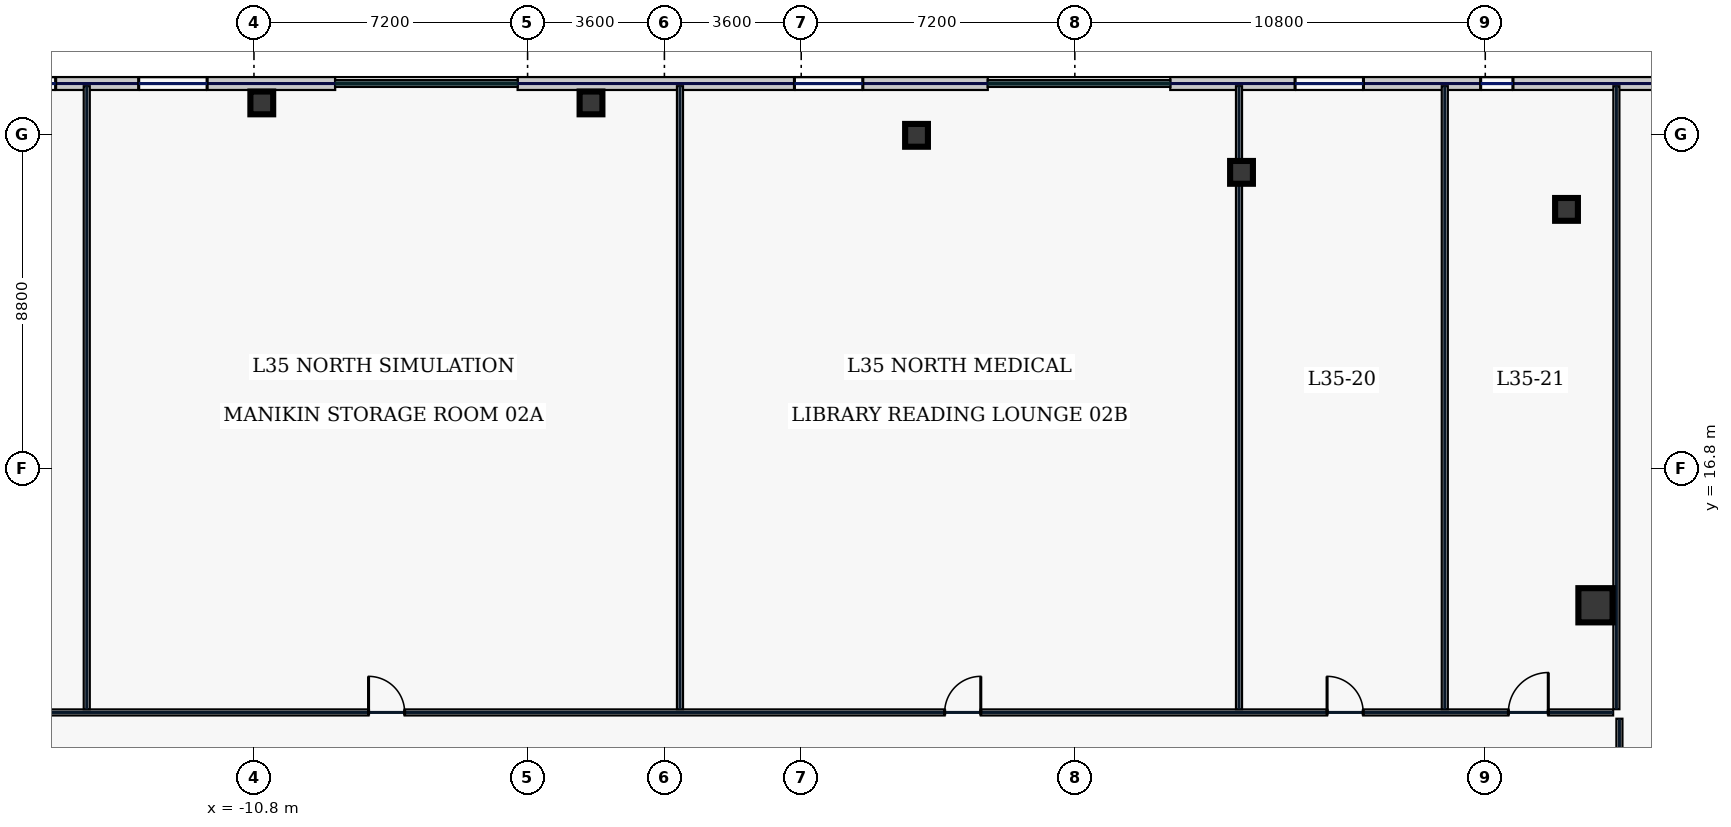
"""IFC4 building model, lengths in metres.
Left out: names, types, materials, properties, quantities, classifications, styles, units other than length and angle.
Written with IfcOpenShell. Run it as: python <this file> out.ifc"""

import sys

from ifc_helpers import new_model, si_unit, direction, frame, frame_2d, origin, origin_2d, place, context, subcontext, project, spatial, rectangle, hollow_rectangle, extrude, element, fill, save


model = new_model("IFC4")
c1 = context("Model", 3, precision=1e-05, world=origin(), true_north=direction((0.0, 1.0)))
c2 = subcontext(c1, "Body", "Model", "MODEL_VIEW")
j1 = project(units=[si_unit("LENGTHUNIT", "METRE"), si_unit("PLANEANGLEUNIT", "RADIAN")], contexts=[c1])
p1 = place(None, origin())
s1 = spatial("IfcSite", under=j1, at=p1, CompositionType="ELEMENT")
p2 = place(p1, origin())
s2 = spatial("IfcBuilding", under=s1, at=p2, CompositionType="ELEMENT")
p3 = place(p2, frame((0.0, 0.0, 156.2)))
s3 = spatial("IfcBuildingStorey", under=s2, at=p3, CompositionType="ELEMENT", Elevation=156.2)
p4 = place(p3, frame((24.5, 13.2, 0.0), z_axis=(0.0, 0.0, 1.0), x_axis=(1.0, 0.0, 0.0)))
e1 = element("IfcColumn", 1, at=p4, inside=s3, PredefinedType="COLUMN", context=c2, shape_type="SweptSolid", body=[
    extrude(hollow_rectangle(XDim=0.9, YDim=0.9, WallThickness=0.04, at=origin_2d()), origin(), (0.0, 0.0, 1.0), 3.74),
])
for number, where, z_axis, x_axis in (
    (2, (23.738, 23.618, 0.0), (0.0, 0.0, 1.0), (1.0, 0.0, 0.0)),
    (3, (15.186, 24.592, 0.0), (0.0, 0.0, 1.0), (1.0, 0.0, 0.0)),
    (4, (6.634, 25.567, 0.0), (0.0, 0.0, 1.0), (1.0, 0.0, 0.0)),
    (5, (-1.931, 26.42, 0.0), (0.0, 0.0, 1.0), (1.0, 0.0, 0.0)),
    (6, (-10.594, 26.42, 0.0), (0.0, 0.0, 1.0), (1.0, 0.0, 0.0)),
):
    element("IfcColumn", number, at=place(p3, frame(where, z_axis=z_axis, x_axis=x_axis)), inside=s3, PredefinedType="COLUMN", context=c2, shape_type="SweptSolid", body=[
        extrude(hollow_rectangle(XDim=0.6, YDim=0.6, WallThickness=0.028, at=origin_2d()), origin(), (0.0, 0.0, 1.0), 3.74),
    ])
p5 = place(p3, frame((33.4, 26.93, 0.0), z_axis=(0.0, 0.0, 1.0), x_axis=(-1.0, 0.0, 0.0)))
e7 = element("IfcWall", 7, at=p5, inside=s3, PredefinedType="STANDARD", context=c2, shape_type="SweptSolid", body=[
    extrude(rectangle(XDim=20.09, YDim=0.34, at=frame_2d((10.045, 0.0))), origin(), (0.0, 0.0, 1.0), 3.74),
])
p6 = place(p5, frame((15.005, 0.0, 0.7)))
e8 = element("IfcOpeningElement", 8, at=p6, cuts=e7, PredefinedType="OPENING", context=c2, shape_type="SweptSolid", body=[
    extrude(rectangle(XDim=1.8, YDim=2.2, at=frame_2d((0.9, 1.1))), frame((0.0, 0.18, 0.0), z_axis=(0.0, -1.0, 0.0), x_axis=(1.0, 0.0, 0.0)), (0.0, 0.0, 1.0), 0.36),
])
p7 = place(p5, frame((11.071, 0.0, 0.7)))
e9 = element("IfcOpeningElement", 9, at=p7, cuts=e7, PredefinedType="OPENING", context=c2, shape_type="SweptSolid", body=[
    extrude(rectangle(XDim=0.85, YDim=1.85, at=frame_2d((0.425, 0.925))), frame((0.0, 0.18, 0.0), z_axis=(0.0, -1.0, 0.0), x_axis=(1.0, 0.0, 0.0)), (0.0, 0.0, 1.0), 0.36),
])
p8 = place(p5, frame((6.48, 0.0, 0.7)))
e10 = element("IfcOpeningElement", 10, at=p8, cuts=e7, PredefinedType="OPENING", context=c2, shape_type="SweptSolid", body=[
    extrude(rectangle(XDim=0.85, YDim=1.85, at=frame_2d((0.425, 0.925))), frame((0.0, 0.18, 0.0), z_axis=(0.0, -1.0, 0.0), x_axis=(1.0, 0.0, 0.0)), (0.0, 0.0, 1.0), 0.36),
])
p9 = place(p5, frame((2.591, 0.0, 0.7)))
e11 = element("IfcOpeningElement", 11, at=p9, cuts=e7, PredefinedType="OPENING", context=c2, shape_type="SweptSolid", body=[
    extrude(rectangle(XDim=1.8, YDim=2.2, at=frame_2d((0.9, 1.1))), frame((0.0, 0.18, 0.0), z_axis=(0.0, -1.0, 0.0), x_axis=(1.0, 0.0, 0.0)), (0.0, 0.0, 1.0), 0.36),
])
p10 = place(p3, frame((8.51, 26.93, 0.0), z_axis=(0.0, 0.0, 1.0), x_axis=(-1.0, 0.0, 0.0)))
e12 = element("IfcWall", 12, at=p10, inside=s3, PredefinedType="STANDARD", context=c2, shape_type="SweptSolid", body=[
    extrude(rectangle(XDim=12.373, YDim=0.34, at=frame_2d((6.187, 0.0))), origin(), (0.0, 0.0, 1.0), 3.74),
])
p11 = place(p10, frame((3.289, 0.0, 0.7)))
e13 = element("IfcOpeningElement", 13, at=p11, cuts=e12, PredefinedType="OPENING", context=c2, shape_type="SweptSolid", body=[
    extrude(rectangle(XDim=1.8, YDim=2.2, at=frame_2d((0.9, 1.1))), frame((0.0, 0.18, 0.0), z_axis=(0.0, -1.0, 0.0), x_axis=(1.0, 0.0, 0.0)), (0.0, 0.0, 1.0), 0.36),
])
p12 = place(p3, frame((-8.663, 26.93, 0.0), z_axis=(0.0, 0.0, 1.0), x_axis=(-1.0, 0.0, 0.0)))
e14 = element("IfcWall", 14, at=p12, inside=s3, PredefinedType="STANDARD", context=c2, shape_type="SweptSolid", body=[
    extrude(rectangle(XDim=19.937, YDim=0.34, at=frame_2d((9.969, 0.0))), origin(), (0.0, 0.0, 1.0), 3.74),
])
p13 = place(p12, frame((16.968, 0.0, 0.7)))
e15 = element("IfcOpeningElement", 15, at=p13, cuts=e14, PredefinedType="OPENING", context=c2, shape_type="SweptSolid", body=[
    extrude(rectangle(XDim=0.85, YDim=1.85, at=frame_2d((0.425, 0.925))), frame((0.0, 0.18, 0.0), z_axis=(0.0, -1.0, 0.0), x_axis=(1.0, 0.0, 0.0)), (0.0, 0.0, 1.0), 0.36),
])
p14 = place(p12, frame((12.033, 0.0, 0.7)))
e16 = element("IfcOpeningElement", 16, at=p14, cuts=e14, PredefinedType="OPENING", context=c2, shape_type="SweptSolid", body=[
    extrude(rectangle(XDim=1.8, YDim=2.2, at=frame_2d((0.9, 1.1))), frame((0.0, 0.18, 0.0), z_axis=(0.0, -1.0, 0.0), x_axis=(1.0, 0.0, 0.0)), (0.0, 0.0, 1.0), 0.36),
])
p15 = place(p12, frame((7.355, 0.0, 0.7)))
e17 = element("IfcOpeningElement", 17, at=p15, cuts=e14, PredefinedType="OPENING", context=c2, shape_type="SweptSolid", body=[
    extrude(rectangle(XDim=1.8, YDim=2.2, at=frame_2d((0.9, 1.1))), frame((0.0, 0.18, 0.0), z_axis=(0.0, -1.0, 0.0), x_axis=(1.0, 0.0, 0.0)), (0.0, 0.0, 1.0), 0.36),
])
p16 = place(p12, frame((3.371, 0.0, 0.7)))
e18 = element("IfcOpeningElement", 18, at=p16, cuts=e14, PredefinedType="OPENING", context=c2, shape_type="SweptSolid", body=[
    extrude(rectangle(XDim=1.8, YDim=2.2, at=frame_2d((0.9, 1.1))), frame((0.0, 0.18, 0.0), z_axis=(0.0, -1.0, 0.0), x_axis=(1.0, 0.0, 0.0)), (0.0, 0.0, 1.0), 0.36),
])
p17 = place(p3, frame((-24.965, 10.38, 0.0), z_axis=(0.0, 0.0, 1.0), x_axis=(1.0, 0.0, 0.0)))
e19 = element("IfcWall", 19, at=p17, inside=s3, PredefinedType="PARTITIONING", context=c2, shape_type="SweptSolid", body=[
    extrude(rectangle(XDim=49.93, YDim=0.16, at=frame_2d((24.965, 0.0))), origin(), (0.0, 0.0, 1.0), 3.74),
])
p18 = place(p17, frame((2.406, 0.0, 0.0)))
e20 = element("IfcOpeningElement", 20, at=p18, cuts=e19, PredefinedType="OPENING", context=c2, shape_type="SweptSolid", body=[
    extrude(rectangle(XDim=1.05, YDim=2.2, at=frame_2d((0.525, 1.1))), frame((0.0, 0.09, 0.0), z_axis=(0.0, -1.0, 0.0), x_axis=(1.0, 0.0, 0.0)), (0.0, 0.0, 1.0), 0.18),
])
p19 = place(p17, frame((7.137, 0.0, 0.0)))
e21 = element("IfcOpeningElement", 21, at=p19, cuts=e19, PredefinedType="OPENING", context=c2, shape_type="SweptSolid", body=[
    extrude(rectangle(XDim=0.95, YDim=2.2, at=frame_2d((0.475, 1.1))), frame((0.0, 0.09, 0.0), z_axis=(0.0, -1.0, 0.0), x_axis=(1.0, 0.0, 0.0)), (0.0, 0.0, 1.0), 0.18),
])
p20 = place(p17, frame((17.18, 0.0, 0.0)))
e22 = element("IfcOpeningElement", 22, at=p20, cuts=e19, PredefinedType="OPENING", context=c2, shape_type="SweptSolid", body=[
    extrude(rectangle(XDim=0.95, YDim=2.2, at=frame_2d((0.475, 1.1))), frame((0.0, 0.09, 0.0), z_axis=(0.0, -1.0, 0.0), x_axis=(1.0, 0.0, 0.0)), (0.0, 0.0, 1.0), 0.18),
])
p21 = place(p17, frame((32.34, 0.0, 0.0)))
e23 = element("IfcOpeningElement", 23, at=p21, cuts=e19, PredefinedType="OPENING", context=c2, shape_type="SweptSolid", body=[
    extrude(rectangle(XDim=0.95, YDim=2.2, at=frame_2d((0.475, 1.1))), frame((0.0, 0.09, 0.0), z_axis=(0.0, -1.0, 0.0), x_axis=(1.0, 0.0, 0.0)), (0.0, 0.0, 1.0), 0.18),
])
p22 = place(p17, frame((42.403, 0.0, 0.0)))
e24 = element("IfcOpeningElement", 24, at=p22, cuts=e19, PredefinedType="OPENING", context=c2, shape_type="SweptSolid", body=[
    extrude(rectangle(XDim=0.95, YDim=2.2, at=frame_2d((0.475, 1.1))), frame((0.0, 0.09, 0.0), z_axis=(0.0, -1.0, 0.0), x_axis=(1.0, 0.0, 0.0)), (0.0, 0.0, 1.0), 0.18),
])
p23 = place(p17, frame((47.173, 0.0, 0.0)))
e25 = element("IfcOpeningElement", 25, at=p23, cuts=e19, PredefinedType="OPENING", context=c2, shape_type="SweptSolid", body=[
    extrude(rectangle(XDim=1.05, YDim=2.2, at=frame_2d((0.525, 1.1))), frame((0.0, 0.09, 0.0), z_axis=(0.0, -1.0, 0.0), x_axis=(1.0, 0.0, 0.0)), (0.0, 0.0, 1.0), 0.18),
])
p24 = place(p3, frame((25.13, 10.215, 0.0), z_axis=(0.0, 0.0, 1.0), x_axis=(0.0, -1.0, 0.0)))
e26 = element("IfcWall", 26, at=p24, inside=s3, PredefinedType="PARTITIONING", context=c2, shape_type="SweptSolid", body=[
    extrude(rectangle(XDim=2.98, YDim=0.16, at=frame_2d((1.49, 0.0))), origin(), (0.0, 0.0, 1.0), 3.74),
])
p25 = place(p24, frame((1.1, 0.0, 0.0)))
e27 = element("IfcOpeningElement", 27, at=p25, cuts=e26, PredefinedType="OPENING", context=c2, shape_type="SweptSolid", body=[
    extrude(rectangle(XDim=0.95, YDim=2.2, at=frame_2d((0.475, 1.1))), frame((0.0, 0.09, 0.0), z_axis=(0.0, -1.0, 0.0), x_axis=(1.0, 0.0, 0.0)), (0.0, 0.0, 1.0), 0.18),
])
for number, where, z_axis, x_axis in (
    (28, (25.05, 10.465, 0.0), (0.0, 0.0, 1.0), (0.0, 1.0, 0.0)),
    (29, (-15.2, 10.465, 0.0), (0.0, 0.0, 1.0), (0.0, 1.0, 0.0)),
    (30, (15.12, 10.465, 0.0), (0.0, 0.0, 1.0), (0.0, 1.0, 0.0)),
    (31, (0.41, 10.465, 0.0), (0.0, 0.0, 1.0), (0.0, 1.0, 0.0)),
    (32, (20.535, 10.465, 0.0), (0.0, 0.0, 1.0), (0.0, 1.0, 0.0)),
):
    element("IfcWall", number, at=place(p3, frame(where, z_axis=z_axis, x_axis=x_axis)), inside=s3, PredefinedType="PARTITIONING", context=c2, shape_type="SweptSolid", body=[
        extrude(rectangle(XDim=16.395, YDim=0.16, at=frame_2d((8.198, 0.0))), origin(), (0.0, 0.0, 1.0), 3.74),
    ])
p26 = place(p6, origin())
e33 = element("IfcWindow", 33, at=p26, inside=s3, PartitioningType="SINGLE_PANEL", PredefinedType="WINDOW", context=c2, shape_type="SweptSolid", body=[
    extrude(rectangle(XDim=1.8, YDim=2.2, at=frame_2d((0.9, 1.1))), frame((0.0, 0.03, 0.0), z_axis=(0.0, -1.0, 0.0), x_axis=(1.0, 0.0, 0.0)), (0.0, 0.0, 1.0), 0.06),
])
fill(e8, e33)
p27 = place(p7, origin())
e34 = element("IfcWindow", 34, at=p27, inside=s3, PartitioningType="SINGLE_PANEL", PredefinedType="WINDOW", context=c2, shape_type="SweptSolid", body=[
    extrude(rectangle(XDim=0.85, YDim=1.85, at=frame_2d((0.425, 0.925))), frame((0.0, 0.03, 0.0), z_axis=(0.0, -1.0, 0.0), x_axis=(1.0, 0.0, 0.0)), (0.0, 0.0, 1.0), 0.06),
])
fill(e9, e34)
p28 = place(p11, origin())
e35 = element("IfcWindow", 35, at=p28, inside=s3, PartitioningType="SINGLE_PANEL", PredefinedType="WINDOW", context=c2, shape_type="SweptSolid", body=[
    extrude(rectangle(XDim=1.8, YDim=2.2, at=frame_2d((0.9, 1.1))), frame((0.0, 0.03, 0.0), z_axis=(0.0, -1.0, 0.0), x_axis=(1.0, 0.0, 0.0)), (0.0, 0.0, 1.0), 0.06),
])
fill(e13, e35)
p29 = place(p15, origin())
e36 = element("IfcWindow", 36, at=p29, inside=s3, PartitioningType="SINGLE_PANEL", PredefinedType="WINDOW", context=c2, shape_type="SweptSolid", body=[
    extrude(rectangle(XDim=1.8, YDim=2.2, at=frame_2d((0.9, 1.1))), frame((0.0, 0.03, 0.0), z_axis=(0.0, -1.0, 0.0), x_axis=(1.0, 0.0, 0.0)), (0.0, 0.0, 1.0), 0.06),
])
fill(e17, e36)
p30 = place(p16, origin())
e37 = element("IfcWindow", 37, at=p30, inside=s3, PartitioningType="SINGLE_PANEL", PredefinedType="WINDOW", context=c2, shape_type="SweptSolid", body=[
    extrude(rectangle(XDim=1.8, YDim=2.2, at=frame_2d((0.9, 1.1))), frame((0.0, 0.03, 0.0), z_axis=(0.0, -1.0, 0.0), x_axis=(1.0, 0.0, 0.0)), (0.0, 0.0, 1.0), 0.06),
])
fill(e18, e37)
p31 = place(p20, origin())
e38 = element("IfcDoor", 38, at=p31, inside=s3, OperationType="SINGLE_SWING_LEFT", PredefinedType="DOOR", context=c2, shape_type="SweptSolid", body=[
    extrude(rectangle(XDim=0.95, YDim=2.2, at=frame_2d((0.475, 1.1))), frame((0.0, 0.025, 0.0), z_axis=(0.0, -1.0, 0.0), x_axis=(1.0, 0.0, 0.0)), (0.0, 0.0, 1.0), 0.05),
])
fill(e22, e38)
p32 = place(p21, origin())
e39 = element("IfcDoor", 39, at=p32, inside=s3, OperationType="SINGLE_SWING_RIGHT", PredefinedType="DOOR", context=c2, shape_type="SweptSolid", body=[
    extrude(rectangle(XDim=0.95, YDim=2.2, at=frame_2d((0.475, 1.1))), frame((0.0, 0.025, 0.0), z_axis=(0.0, -1.0, 0.0), x_axis=(1.0, 0.0, 0.0)), (0.0, 0.0, 1.0), 0.05),
])
fill(e23, e39)
p33 = place(p22, origin())
e40 = element("IfcDoor", 40, at=p33, inside=s3, OperationType="SINGLE_SWING_LEFT", PredefinedType="DOOR", context=c2, shape_type="SweptSolid", body=[
    extrude(rectangle(XDim=0.95, YDim=2.2, at=frame_2d((0.475, 1.1))), frame((0.0, 0.025, 0.0), z_axis=(0.0, -1.0, 0.0), x_axis=(1.0, 0.0, 0.0)), (0.0, 0.0, 1.0), 0.05),
])
fill(e24, e40)
p34 = place(p23, origin())
e41 = element("IfcDoor", 41, at=p34, inside=s3, OperationType="SINGLE_SWING_RIGHT", PredefinedType="DOOR", context=c2, shape_type="SweptSolid", body=[
    extrude(rectangle(XDim=1.05, YDim=2.2, at=frame_2d((0.525, 1.1))), frame((0.0, 0.025, 0.0), z_axis=(0.0, -1.0, 0.0), x_axis=(1.0, 0.0, 0.0)), (0.0, 0.0, 1.0), 0.05),
])
fill(e25, e41)
save(model, sys.argv[1])
